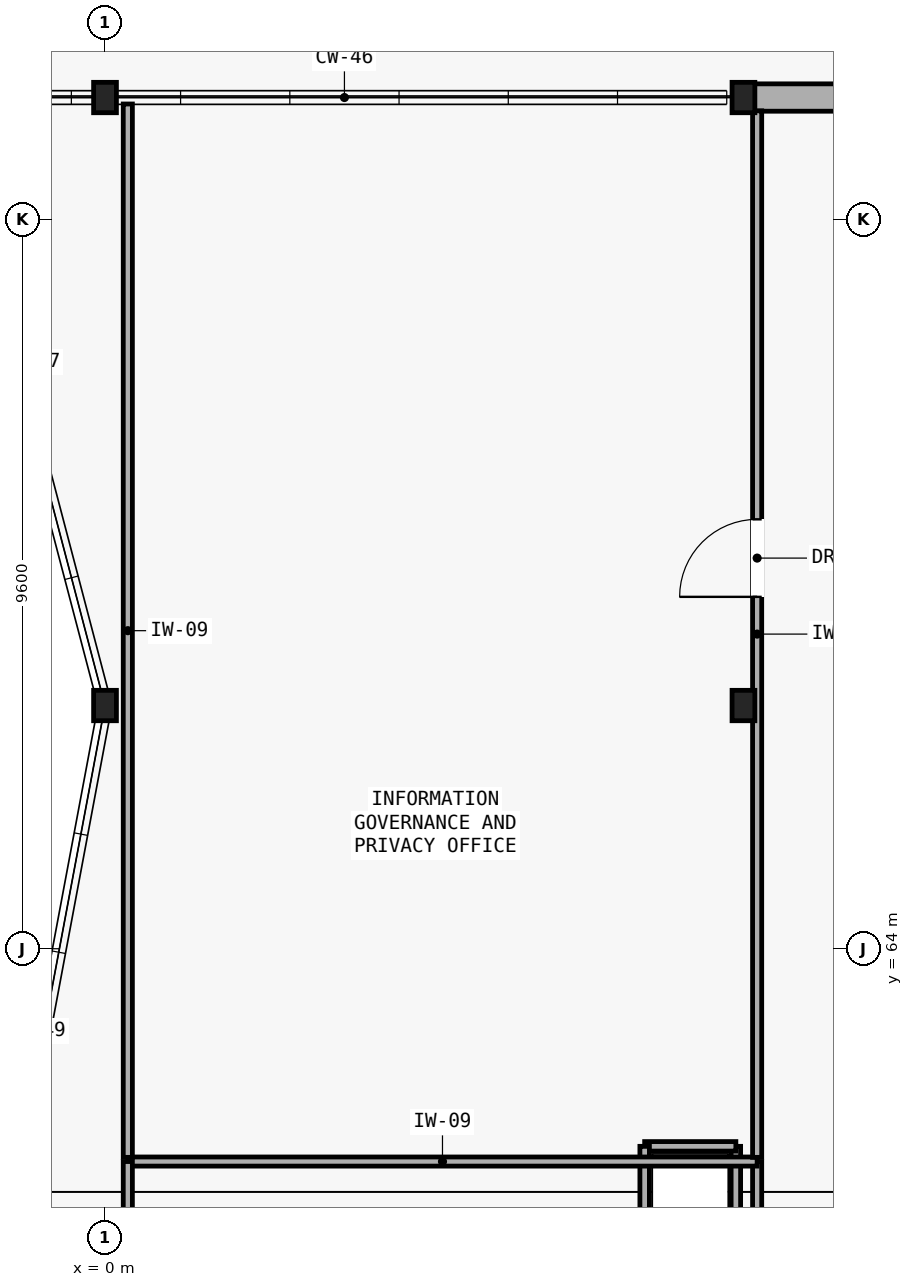
"""IFC4 building model, lengths in metres.
Left out: names, types, materials, properties, quantities, classifications, styles, units other than length and angle.
Written with IfcOpenShell. Run it as: python <this file> out.ifc"""

import sys

from ifc_helpers import new_model, si_unit, direction, frame, frame_2d, origin, origin_2d, place, context, subcontext, project, spatial, rectangle, i_section, extrude, element, fill, save


model = new_model("IFC4")
c1 = context("Model", 3, precision=1e-05, world=origin(), true_north=direction((0.0, 1.0)))
c2 = subcontext(c1, "Body", "Model", "MODEL_VIEW")
j1 = project(units=[si_unit("LENGTHUNIT", "METRE"), si_unit("PLANEANGLEUNIT", "RADIAN")], contexts=[c1])
p1 = place(None, origin())
s1 = spatial("IfcSite", under=j1, at=p1, CompositionType="ELEMENT")
p2 = place(p1, origin())
s2 = spatial("IfcBuilding", under=s1, at=p2, CompositionType="ELEMENT")
p3 = place(p2, frame((0.0, 0.0, 22.05)))
s3 = spatial("IfcBuildingStorey", under=s2, at=p3, CompositionType="ELEMENT", Elevation=22.05)
for number, where, z_axis, x_axis in (
    (1, (0.0, 67.2, 0.0), (0.0, 0.0, 1.0), (1.0, 0.0, 0.0)),
    (2, (8.4, 67.2, 0.0), (0.0, 0.0, 1.0), (1.0, 0.0, 0.0)),
    (3, (0.0, 75.2, 0.0), (0.0, 0.0, 1.0), (1.0, 0.0, 0.0)),
    (4, (8.4, 75.2, 0.0), (0.0, 0.0, 1.0), (1.0, 0.0, 0.0)),
):
    element("IfcColumn", number, at=place(p3, frame(where, z_axis=z_axis, x_axis=x_axis)), inside=s3, PredefinedType="COLUMN", context=c2, shape_type="SweptSolid", body=[
        extrude(i_section(OverallWidth=0.3, OverallDepth=0.4, WebThickness=0.013, FlangeThickness=0.024, FilletRadius=0.027, at=origin_2d()), origin(), (0.0, 0.0, 1.0), 4.2),
    ])
p4 = place(p3, frame((8.409, 75.2, 0.0), z_axis=(0.0, 0.0, 1.0), x_axis=(1.0, 0.0, 0.0)))
e5 = element("IfcWall", 5, at=p4, inside=s3, PredefinedType="SOLIDWALL", context=c2, shape_type="SweptSolid", body=[
    extrude(rectangle(XDim=5.782, YDim=0.36, at=frame_2d((2.891, 0.0))), origin(), (0.0, 0.0, 1.0), 3.505),
])
p5 = place(p4, frame((3.041, 0.0, 0.9)))
e6 = element("IfcOpeningElement", 6, at=p5, cuts=e5, PredefinedType="OPENING", context=c2, shape_type="SweptSolid", body=[
    extrude(rectangle(XDim=1.8, YDim=1.15, at=frame_2d((0.9, 0.575))), frame((0.0, 0.19, 0.0), z_axis=(0.0, -1.0, 0.0), x_axis=(1.0, 0.0, 0.0)), (0.0, 0.0, 1.0), 0.38),
])
p6 = place(p3, frame((8.3, 60.2, 0.0), z_axis=(0.0, 0.0, 1.0), x_axis=(0.0, 1.0, 0.0)))
e7 = element("IfcWall", 7, at=p6, inside=s3, PredefinedType="PARTITIONING", context=c2, shape_type="SweptSolid", body=[
    extrude(rectangle(XDim=1.2, YDim=0.125, at=frame_2d((0.6, 0.0))), origin(), (0.0, 0.0, 1.0), 3.505),
])
for number, where, z_axis, x_axis in (
    (8, (8.3, 61.4, 0.0), (0.0, 0.0, 1.0), (-1.0, 0.0, 0.0)),
    (9, (7.1, 61.4, 0.0), (0.0, 0.0, 1.0), (0.0, -1.0, 0.0)),
):
    element("IfcWall", number, at=place(p3, frame(where, z_axis=z_axis, x_axis=x_axis)), inside=s3, PredefinedType="PARTITIONING", context=c2, shape_type="SweptSolid", body=[
        extrude(rectangle(XDim=1.2, YDim=0.125, at=frame_2d((0.6, 0.0))), origin(), (0.0, 0.0, 1.0), 4.0),
    ])
p7 = place(p3, frame((8.58, 48.25, 0.0), z_axis=(0.0, 0.0, 1.0), x_axis=(0.0, 1.0, 0.0)))
e10 = element("IfcWall", 10, at=p7, inside=s3, PredefinedType="PARTITIONING", context=c2, shape_type="SweptSolid", body=[
    extrude(rectangle(XDim=12.95, YDim=0.12, at=frame_2d((6.475, 0.0))), origin(), (0.0, 0.0, 1.0), 3.505),
])
p8 = place(p7, frame((5.985, 0.0, 0.0)))
e11 = element("IfcOpeningElement", 11, at=p8, cuts=e10, PredefinedType="OPENING", context=c2, shape_type="SweptSolid", body=[
    extrude(rectangle(XDim=0.98, YDim=2.1, at=frame_2d((0.49, 1.05))), frame((0.0, 0.07, 0.0), z_axis=(0.0, -1.0, 0.0), x_axis=(1.0, 0.0, 0.0)), (0.0, 0.0, 1.0), 0.14),
])
p9 = place(p3, frame((8.58, 61.2, 0.0), z_axis=(0.0, 0.0, 1.0), x_axis=(-1.0, 0.0, 0.0)))
e12 = element("IfcWall", 12, at=p9, inside=s3, PredefinedType="PARTITIONING", context=c2, shape_type="SweptSolid", body=[
    extrude(rectangle(XDim=8.28, YDim=0.12, at=frame_2d((4.14, 0.0))), origin(), (0.0, 0.0, 1.0), 4.0),
])
p10 = place(p3, frame((0.3, 61.2, 0.0), z_axis=(0.0, 0.0, 1.0), x_axis=(0.0, -1.0, 0.0)))
e13 = element("IfcWall", 13, at=p10, inside=s3, PredefinedType="PARTITIONING", context=c2, shape_type="SweptSolid", body=[
    extrude(rectangle(XDim=12.95, YDim=0.12, at=frame_2d((6.475, 0.0))), origin(), (0.0, 0.0, 1.0), 4.0),
])
p11 = place(p3, frame((8.58, 61.255, 0.0), z_axis=(0.0, 0.0, 1.0), x_axis=(0.0, 1.0, 0.0)))
e14 = element("IfcWall", 14, at=p11, inside=s3, PredefinedType="PARTITIONING", context=c2, shape_type="SweptSolid", body=[
    extrude(rectangle(XDim=13.77, YDim=0.12, at=frame_2d((6.885, 0.0))), origin(), (0.0, 0.0, 1.0), 3.505),
])
p12 = place(p11, frame((7.375, 0.0, 0.0)))
e15 = element("IfcOpeningElement", 15, at=p12, cuts=e14, PredefinedType="OPENING", context=c2, shape_type="SweptSolid", body=[
    extrude(rectangle(XDim=1.02, YDim=2.1, at=frame_2d((0.51, 1.05))), frame((0.0, 0.07, 0.0), z_axis=(0.0, -1.0, 0.0), x_axis=(1.0, 0.0, 0.0)), (0.0, 0.0, 1.0), 0.14),
])
p13 = place(p3, frame((0.3, 75.115, 0.0), z_axis=(0.0, 0.0, 1.0), x_axis=(0.0, -1.0, 0.0)))
e16 = element("IfcWall", 16, at=p13, inside=s3, PredefinedType="PARTITIONING", context=c2, shape_type="SweptSolid", body=[
    extrude(rectangle(XDim=13.86, YDim=0.12, at=frame_2d((6.93, 0.0))), origin(), (0.0, 0.0, 1.0), 4.0),
])
p14 = place(p12, origin())
e17 = element("IfcDoor", 17, at=p14, inside=s3, OperationType="SINGLE_SWING_LEFT", PredefinedType="DOOR", context=c2, shape_type="SweptSolid", body=[
    extrude(rectangle(XDim=1.02, YDim=2.1, at=frame_2d((0.51, 1.05))), frame((0.0, 0.025, 0.0), z_axis=(0.0, -1.0, 0.0), x_axis=(1.0, 0.0, 0.0)), (0.0, 0.0, 1.0), 0.05),
])
fill(e15, e17)
save(model, sys.argv[1])
